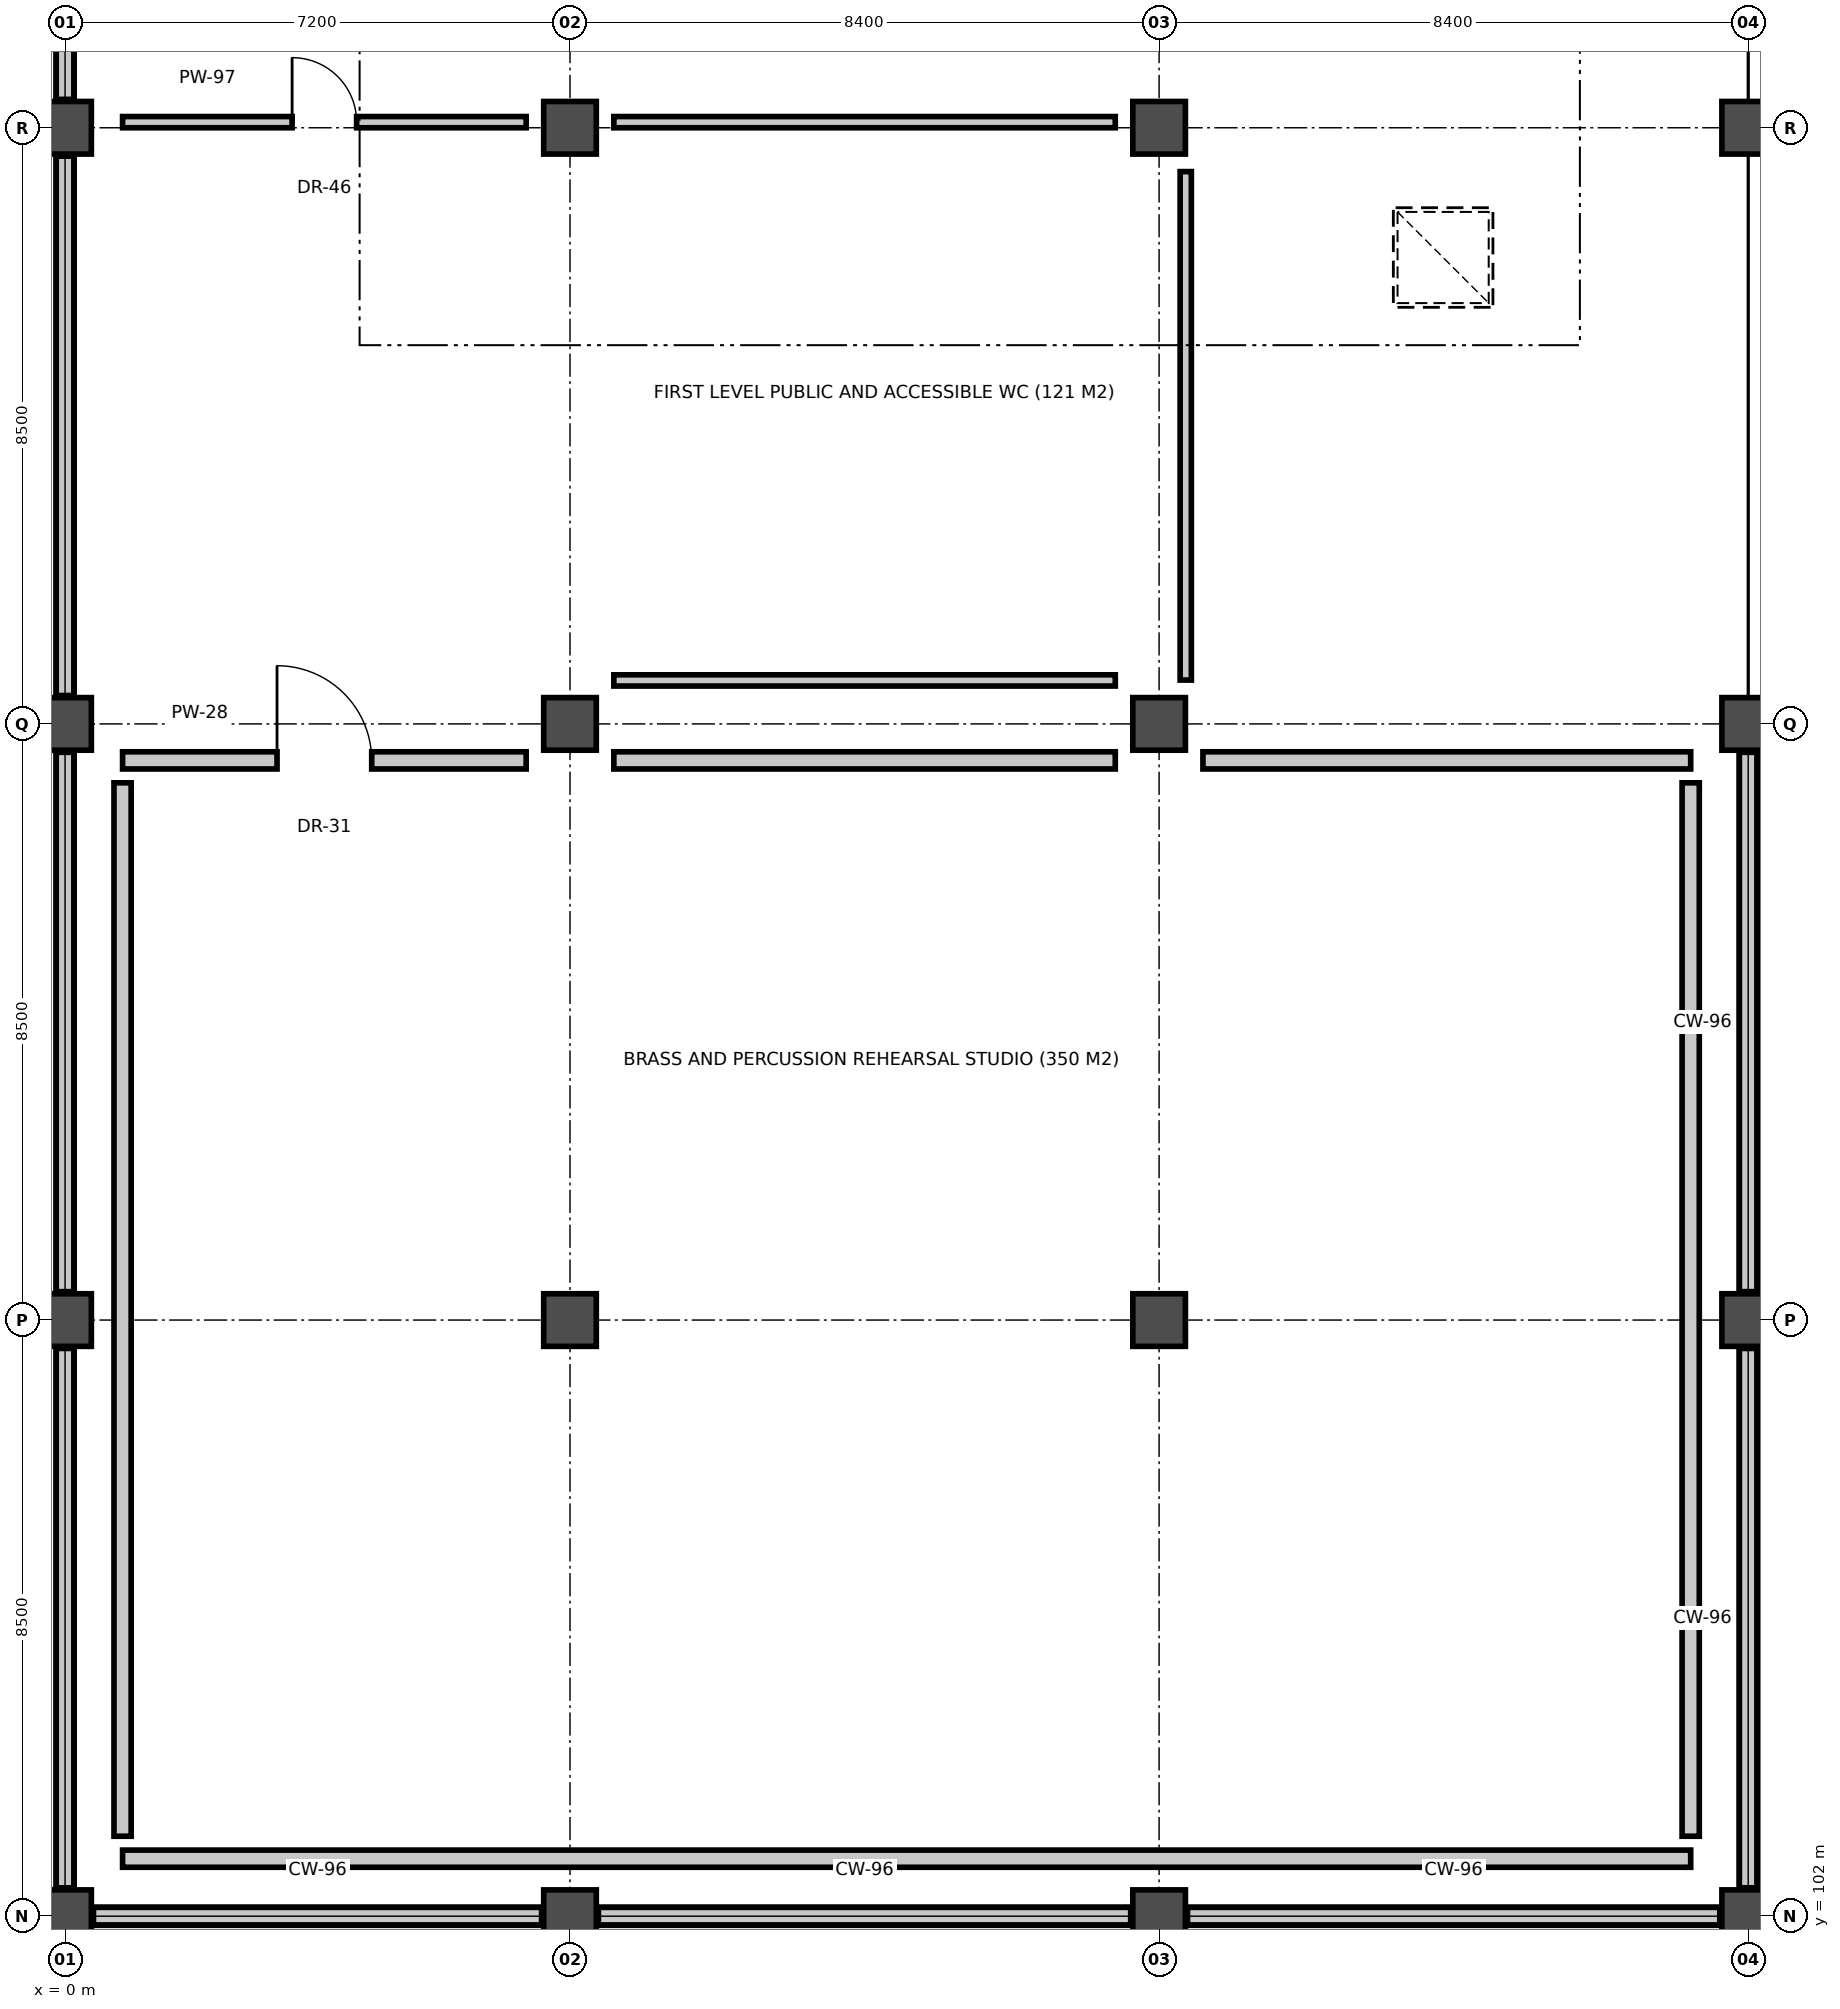
"""IFC4 building model, lengths in metres.
Left out: names, types, materials, properties, quantities, classifications, styles, units other than length and angle.
Written with IfcOpenShell. Run it as: python <this file> out.ifc"""

import sys

from ifc_helpers import new_model, si_unit, direction, frame, frame_2d, origin, origin_2d, place, context, subcontext, project, spatial, rectangle, extrude, element, fill, save


model = new_model("IFC4")
c1 = context("Model", 3, precision=1e-05, world=origin(), true_north=direction((0.0, 1.0)))
c2 = subcontext(c1, "Body", "Model", "MODEL_VIEW")
j1 = project(units=[si_unit("LENGTHUNIT", "METRE"), si_unit("PLANEANGLEUNIT", "RADIAN")], contexts=[c1])
p1 = place(None, origin())
s1 = spatial("IfcSite", under=j1, at=p1, CompositionType="ELEMENT")
p2 = place(p1, origin())
s2 = spatial("IfcBuilding", under=s1, at=p2, CompositionType="ELEMENT")
p3 = place(p2, frame((0.0, 0.0, 5.4)))
s3 = spatial("IfcBuildingStorey", under=s2, at=p3, CompositionType="ELEMENT", Elevation=5.4)
for number, where, z_axis, x_axis in (
    (1, (0.0, 102.0, 0.0), (0.0, 0.0, 1.0), (1.0, 0.0, 0.0)),
    (2, (0.0, 110.5, 0.0), (0.0, 0.0, 1.0), (1.0, 0.0, 0.0)),
    (3, (0.0, 119.0, 0.0), (0.0, 0.0, 1.0), (1.0, 0.0, 0.0)),
    (4, (0.0, 127.5, 0.0), (0.0, 0.0, 1.0), (1.0, 0.0, 0.0)),
    (5, (7.2, 102.0, 0.0), (0.0, 0.0, 1.0), (1.0, 0.0, 0.0)),
    (6, (7.2, 110.5, 0.0), (0.0, 0.0, 1.0), (1.0, 0.0, 0.0)),
    (7, (7.2, 119.0, 0.0), (0.0, 0.0, 1.0), (1.0, 0.0, 0.0)),
    (8, (7.2, 127.5, 0.0), (0.0, 0.0, 1.0), (1.0, 0.0, 0.0)),
    (9, (15.6, 102.0, 0.0), (0.0, 0.0, 1.0), (1.0, 0.0, 0.0)),
    (10, (15.6, 110.5, 0.0), (0.0, 0.0, 1.0), (1.0, 0.0, 0.0)),
    (11, (15.6, 119.0, 0.0), (0.0, 0.0, 1.0), (1.0, 0.0, 0.0)),
    (12, (15.6, 127.5, 0.0), (0.0, 0.0, 1.0), (1.0, 0.0, 0.0)),
    (13, (24.0, 102.0, 0.0), (0.0, 0.0, 1.0), (1.0, 0.0, 0.0)),
    (14, (24.0, 110.5, 0.0), (0.0, 0.0, 1.0), (1.0, 0.0, 0.0)),
    (15, (24.0, 119.0, 0.0), (0.0, 0.0, 1.0), (1.0, 0.0, 0.0)),
    (16, (24.0, 127.5, 0.0), (0.0, 0.0, 1.0), (1.0, 0.0, 0.0)),
):
    element("IfcColumn", number, at=place(p3, frame(where, z_axis=z_axis, x_axis=x_axis)), inside=s3, PredefinedType="COLUMN", context=c2, shape_type="SweptSolid", body=[
        extrude(rectangle(XDim=0.75, YDim=0.75, at=origin_2d()), origin(), (0.0, 0.0, 1.0), 4.8),
    ])
for number, where, z_axis, x_axis in (
    (17, (0.0, 102.395, 0.0), (0.0, 0.0, 1.0), (0.0, 1.0, 0.0)),
    (18, (0.0, 110.895, 0.0), (0.0, 0.0, 1.0), (0.0, 1.0, 0.0)),
    (19, (0.0, 119.395, 0.0), (0.0, 0.0, 1.0), (0.0, 1.0, 0.0)),
    (20, (0.0, 127.895, 0.0), (0.0, 0.0, 1.0), (0.0, 1.0, 0.0)),
    (21, (24.0, 110.105, 0.0), (0.0, 0.0, 1.0), (0.0, -1.0, 0.0)),
    (22, (24.0, 118.605, 0.0), (0.0, 0.0, 1.0), (0.0, -1.0, 0.0)),
):
    element("IfcWall", number, at=place(p3, frame(where, z_axis=z_axis, x_axis=x_axis)), inside=s3, PredefinedType="PARAPET", context=c2, shape_type="SweptSolid", body=[
        extrude(rectangle(XDim=7.71, YDim=0.26, at=frame_2d((3.855, 0.0))), origin(), (0.0, 0.0, 1.0), 1.12),
    ])
p4 = place(p3, frame((6.805, 102.0, 0.0), z_axis=(0.0, 0.0, 1.0), x_axis=(-1.0, 0.0, 0.0)))
e23 = element("IfcWall", 23, at=p4, inside=s3, PredefinedType="PARAPET", context=c2, shape_type="SweptSolid", body=[
    extrude(rectangle(XDim=6.41, YDim=0.26, at=frame_2d((3.205, 0.0))), origin(), (0.0, 0.0, 1.0), 1.12),
])
p5 = place(p3, frame((15.205, 102.0, 0.0), z_axis=(0.0, 0.0, 1.0), x_axis=(-1.0, 0.0, 0.0)))
e24 = element("IfcWall", 24, at=p5, inside=s3, PredefinedType="PARAPET", context=c2, shape_type="SweptSolid", body=[
    extrude(rectangle(XDim=7.61, YDim=0.26, at=frame_2d((3.805, 0.0))), origin(), (0.0, 0.0, 1.0), 1.12),
])
p6 = place(p3, frame((23.605, 102.0, 0.0), z_axis=(0.0, 0.0, 1.0), x_axis=(-1.0, 0.0, 0.0)))
e25 = element("IfcWall", 25, at=p6, inside=s3, PredefinedType="PARAPET", context=c2, shape_type="SweptSolid", body=[
    extrude(rectangle(XDim=7.61, YDim=0.26, at=frame_2d((3.805, 0.0))), origin(), (0.0, 0.0, 1.0), 1.12),
])
p7 = place(p3, frame((0.82, 118.48, 0.0), z_axis=(0.0, 0.0, 1.0), x_axis=(1.0, 0.0, 0.0)))
e26 = element("IfcWall", 26, at=p7, inside=s3, PredefinedType="PARTITIONING", context=c2, shape_type="SweptSolid", body=[
    extrude(rectangle(XDim=5.755, YDim=0.245, at=frame_2d((2.877, 0.0))), origin(), (0.0, 0.0, 1.0), 3.45),
])
p8 = place(p7, frame((2.202, 0.0, 0.0)))
e27 = element("IfcOpeningElement", 27, at=p8, cuts=e26, PredefinedType="OPENING", context=c2, shape_type="SweptSolid", body=[
    extrude(rectangle(XDim=1.35, YDim=2.32, at=frame_2d((0.675, 1.16))), frame((0.0, 0.133, 0.0), z_axis=(0.0, -1.0, 0.0), x_axis=(1.0, 0.0, 0.0)), (0.0, 0.0, 1.0), 0.265),
])
p9 = place(p3, frame((7.825, 118.48, 0.0), z_axis=(0.0, 0.0, 1.0), x_axis=(1.0, 0.0, 0.0)))
e28 = element("IfcWall", 28, at=p9, inside=s3, PredefinedType="PARTITIONING", context=c2, shape_type="SweptSolid", body=[
    extrude(rectangle(XDim=7.15, YDim=0.245, at=frame_2d((3.575, 0.0))), origin(), (0.0, 0.0, 1.0), 3.45),
])
p10 = place(p3, frame((16.225, 118.48, 0.0), z_axis=(0.0, 0.0, 1.0), x_axis=(1.0, 0.0, 0.0)))
e29 = element("IfcWall", 29, at=p10, inside=s3, PredefinedType="PARTITIONING", context=c2, shape_type="SweptSolid", body=[
    extrude(rectangle(XDim=6.955, YDim=0.245, at=frame_2d((3.478, 0.0))), origin(), (0.0, 0.0, 1.0), 3.45),
])
p11 = place(p3, frame((23.18, 102.82, 0.0), z_axis=(0.0, 0.0, 1.0), x_axis=(-1.0, 0.0, 0.0)))
e30 = element("IfcWall", 30, at=p11, inside=s3, PredefinedType="PARTITIONING", context=c2, shape_type="SweptSolid", body=[
    extrude(rectangle(XDim=22.36, YDim=0.245, at=frame_2d((11.18, 0.0))), origin(), (0.0, 0.0, 1.0), 3.45),
])
for number, where, z_axis, x_axis in (
    (31, (23.18, 118.16, 0.0), (0.0, 0.0, 1.0), (0.0, -1.0, 0.0)),
    (32, (0.82, 103.14, 0.0), (0.0, 0.0, 1.0), (0.0, 1.0, 0.0)),
):
    element("IfcWall", number, at=place(p3, frame(where, z_axis=z_axis, x_axis=x_axis)), inside=s3, PredefinedType="PARTITIONING", context=c2, shape_type="SweptSolid", body=[
        extrude(rectangle(XDim=15.02, YDim=0.245, at=frame_2d((7.51, 0.0))), origin(), (0.0, 0.0, 1.0), 3.45),
    ])
p12 = place(p3, frame((0.82, 127.58, 0.0), z_axis=(0.0, 0.0, 1.0), x_axis=(1.0, 0.0, 0.0)))
e33 = element("IfcWall", 33, at=p12, inside=s3, PredefinedType="PARTITIONING", context=c2, shape_type="SweptSolid", body=[
    extrude(rectangle(XDim=5.755, YDim=0.16, at=frame_2d((2.877, 0.0))), origin(), (0.0, 0.0, 1.0), 3.45),
])
p13 = place(p12, frame((2.417, 0.0, 0.0)))
e34 = element("IfcOpeningElement", 34, at=p13, cuts=e33, PredefinedType="OPENING", context=c2, shape_type="SweptSolid", body=[
    extrude(rectangle(XDim=0.92, YDim=2.12, at=frame_2d((0.46, 1.06))), frame((0.0, 0.09, 0.0), z_axis=(0.0, -1.0, 0.0), x_axis=(1.0, 0.0, 0.0)), (0.0, 0.0, 1.0), 0.18),
])
for number, where, z_axis, x_axis in (
    (35, (7.825, 127.58, 0.0), (0.0, 0.0, 1.0), (1.0, 0.0, 0.0)),
    (36, (14.975, 119.62, 0.0), (0.0, 0.0, 1.0), (-1.0, 0.0, 0.0)),
):
    element("IfcWall", number, at=place(p3, frame(where, z_axis=z_axis, x_axis=x_axis)), inside=s3, PredefinedType="PARTITIONING", context=c2, shape_type="SweptSolid", body=[
        extrude(rectangle(XDim=7.15, YDim=0.16, at=frame_2d((3.575, 0.0))), origin(), (0.0, 0.0, 1.0), 3.45),
    ])
p14 = place(p3, frame((15.98, 126.875, 0.0), z_axis=(0.0, 0.0, 1.0), x_axis=(0.0, -1.0, 0.0)))
e37 = element("IfcWall", 37, at=p14, inside=s3, PredefinedType="PARTITIONING", context=c2, shape_type="SweptSolid", body=[
    extrude(rectangle(XDim=7.25, YDim=0.16, at=frame_2d((3.625, 0.0))), origin(), (0.0, 0.0, 1.0), 3.45),
])
p15 = place(p8, origin())
e38 = element("IfcDoor", 38, at=p15, inside=s3, OperationType="SINGLE_SWING_LEFT", PredefinedType="DOOR", context=c2, shape_type="SweptSolid", body=[
    extrude(rectangle(XDim=1.35, YDim=2.32, at=frame_2d((0.675, 1.16))), frame((0.0, 0.025, 0.0), z_axis=(0.0, -1.0, 0.0), x_axis=(1.0, 0.0, 0.0)), (0.0, 0.0, 1.0), 0.05),
])
fill(e27, e38)
p16 = place(p13, origin())
e39 = element("IfcDoor", 39, at=p16, inside=s3, OperationType="SINGLE_SWING_LEFT", PredefinedType="DOOR", context=c2, shape_type="SweptSolid", body=[
    extrude(rectangle(XDim=0.92, YDim=2.12, at=frame_2d((0.46, 1.06))), frame((0.0, 0.025, 0.0), z_axis=(0.0, -1.0, 0.0), x_axis=(1.0, 0.0, 0.0)), (0.0, 0.0, 1.0), 0.05),
])
fill(e34, e39)
save(model, sys.argv[1])
